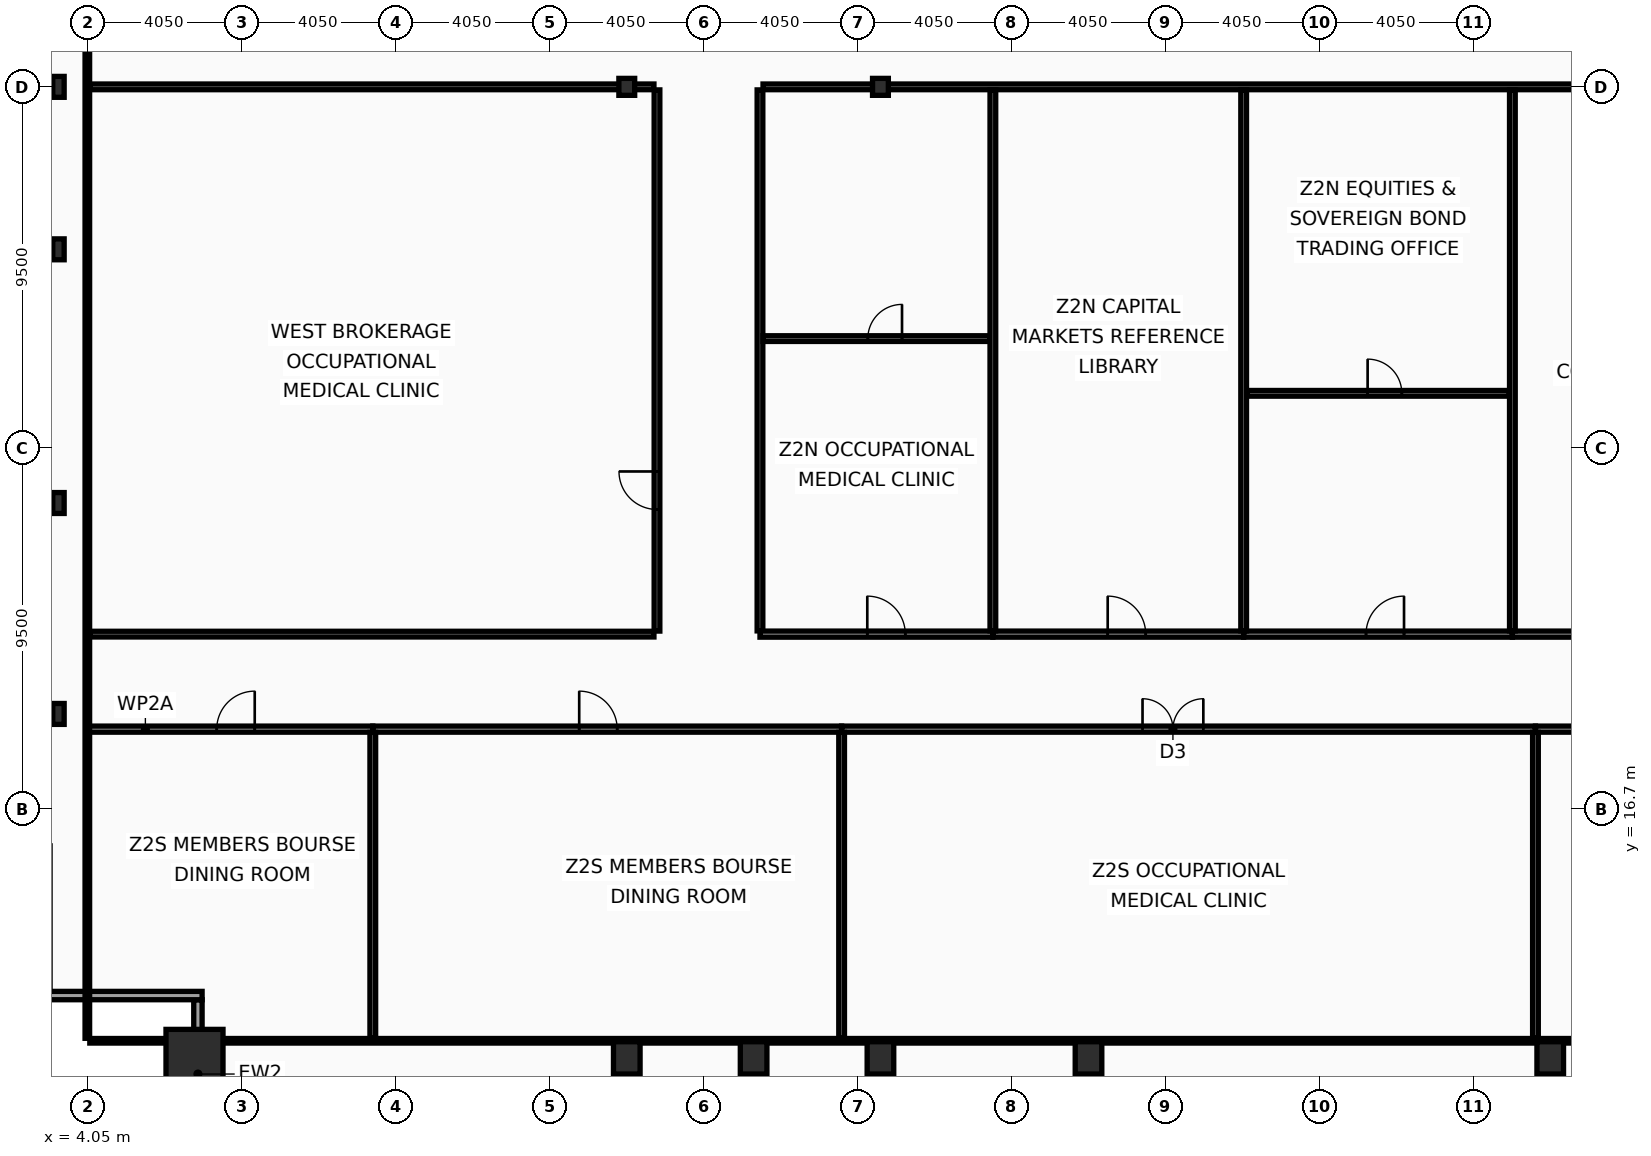
"""IFC4 building model, lengths in metres.
Left out: names, types, materials, properties, quantities, classifications, styles, units other than length and angle.
Written with IfcOpenShell. Run it as: python <this file> out.ifc"""

import sys

from ifc_helpers import new_model, si_unit, direction, frame, frame_2d, origin, origin_2d, place, context, subcontext, project, spatial, rectangle, hollow_rectangle, i_section, extrude, element, fill, save


model = new_model("IFC4")
c1 = context("Model", 3, precision=1e-05, world=origin(), true_north=direction((0.0, 1.0)))
c2 = subcontext(c1, "Body", "Model", "MODEL_VIEW")
j1 = project(units=[si_unit("LENGTHUNIT", "METRE"), si_unit("PLANEANGLEUNIT", "RADIAN")], contexts=[c1])
p1 = place(None, origin())
s1 = spatial("IfcSite", under=j1, at=p1, CompositionType="ELEMENT")
p2 = place(p1, origin())
s2 = spatial("IfcBuilding", under=s1, at=p2, CompositionType="ELEMENT")
p3 = place(p2, frame((0.0, 0.0, 114.6)))
s3 = spatial("IfcBuildingStorey", under=s2, at=p3, CompositionType="ELEMENT", Elevation=114.6)
p4 = place(p3, frame((6.85, 10.15, 0.0), z_axis=(0.0, 0.0, 1.0), x_axis=(1.0, 0.0, 0.0)))
e1 = element("IfcColumn", 1, at=p4, inside=s3, PredefinedType="COLUMN", context=c2, shape_type="SweptSolid", body=[
    extrude(hollow_rectangle(XDim=1.5, YDim=1.5, WallThickness=0.07, at=origin_2d()), origin(), (0.0, 0.0, 1.0), 3.6),
])
for number, where, z_axis, x_axis in (
    (2, (18.225, 10.15, 0.0), (0.0, 0.0, 1.0), (1.0, 0.0, 0.0)),
    (3, (21.562, 10.15, 0.0), (0.0, 0.0, 1.0), (1.0, 0.0, 0.0)),
    (4, (24.9, 10.15, 0.0), (0.0, 0.0, 1.0), (1.0, 0.0, 0.0)),
    (5, (30.375, 10.15, 0.0), (0.0, 0.0, 1.0), (1.0, 0.0, 0.0)),
    (6, (42.525, 10.15, 0.0), (0.0, 0.0, 1.0), (1.0, 0.0, 0.0)),
):
    element("IfcColumn", number, at=place(p3, frame(where, z_axis=z_axis, x_axis=x_axis)), inside=s3, PredefinedType="COLUMN", context=c2, shape_type="SweptSolid", body=[
        extrude(hollow_rectangle(XDim=0.7, YDim=0.85, WallThickness=0.05, at=origin_2d()), origin(), (0.0, 0.0, 1.0), 3.6),
    ])
for number, where, z_axis, x_axis in (
    (7, (3.27, 19.2, 0.0), (0.0, 0.0, 1.0), (1.0, 0.0, 0.0)),
    (8, (3.27, 24.75, 0.0), (0.0, 0.0, 1.0), (1.0, 0.0, 0.0)),
    (9, (3.27, 31.425, 0.0), (0.0, 0.0, 1.0), (1.0, 0.0, 0.0)),
    (10, (3.27, 35.7, 0.0), (0.0, 0.0, 1.0), (1.0, 0.0, 0.0)),
):
    element("IfcColumn", number, at=place(p3, frame(where, z_axis=z_axis, x_axis=x_axis)), inside=s3, PredefinedType="COLUMN", context=c2, shape_type="SweptSolid", body=[
        extrude(i_section(OverallWidth=0.3, OverallDepth=0.55, WebThickness=0.015, FlangeThickness=0.029, at=origin_2d()), origin(), (0.0, 0.0, 1.0), 3.6),
    ])
for number, where, z_axis, x_axis in (
    (11, (18.225, 35.7, 0.0), (0.0, 0.0, 1.0), (1.0, 0.0, 0.0)),
    (12, (24.9, 35.7, 0.0), (0.0, 0.0, 1.0), (1.0, 0.0, 0.0)),
):
    element("IfcColumn", number, at=place(p3, frame(where, z_axis=z_axis, x_axis=x_axis)), inside=s3, PredefinedType="COLUMN", context=c2, shape_type="SweptSolid", body=[
        extrude(i_section(OverallWidth=0.416, OverallDepth=0.446, WebThickness=0.039, FlangeThickness=0.063, at=origin_2d()), origin(), (0.0, 0.0, 1.0), 3.6),
    ])
p5 = place(p3, frame((6.94, 7.77, 0.0), z_axis=(0.0, 0.0, 1.0), x_axis=(0.0, 1.0, 0.0)))
e13 = element("IfcWall", 13, at=p5, inside=s3, PredefinedType="SOLIDWALL", context=c2, shape_type="SweptSolid", body=[
    extrude(rectangle(XDim=3.91, YDim=0.22, at=frame_2d((1.955, 0.0))), origin(), (0.0, 0.0, 1.0), 2.83),
])
p6 = place(p3, frame((7.05, 11.79, 0.0), z_axis=(0.0, 0.0, 1.0), x_axis=(-1.0, 0.0, 0.0)))
e14 = element("IfcWall", 14, at=p6, inside=s3, PredefinedType="SOLIDWALL", context=c2, shape_type="SweptSolid", body=[
    extrude(rectangle(XDim=4.22, YDim=0.22, at=frame_2d((2.11, 0.0))), origin(), (0.0, 0.0, 1.0), 2.83),
])
p7 = place(p3, frame((4.03, 18.8, 0.0), z_axis=(0.0, 0.0, 1.0), x_axis=(1.0, 0.0, 0.0)))
e15 = element("IfcWall", 15, at=p7, inside=s3, PredefinedType="PARTITIONING", context=c2, shape_type="SweptSolid", body=[
    extrude(rectangle(XDim=7.511, YDim=0.16, at=frame_2d((3.756, 0.0))), origin(), (0.0, 0.0, 1.0), 2.73),
])
p8 = place(p7, frame((3.405, 0.0, 0.0)))
e16 = element("IfcOpeningElement", 16, at=p8, cuts=e15, PredefinedType="OPENING", context=c2, shape_type="SweptSolid", body=[
    extrude(rectangle(XDim=1.0, YDim=2.05, at=frame_2d((0.5, 1.025))), frame((0.0, 0.09, 0.0), z_axis=(0.0, -1.0, 0.0), x_axis=(1.0, 0.0, 0.0)), (0.0, 0.0, 1.0), 0.18),
])
p9 = place(p3, frame((11.542, 18.8, 0.0), z_axis=(0.0, 0.0, 1.0), x_axis=(1.0, 0.0, 0.0)))
e17 = element("IfcWall", 17, at=p9, inside=s3, PredefinedType="PARTITIONING", context=c2, shape_type="SweptSolid", body=[
    extrude(rectangle(XDim=12.337, YDim=0.16, at=frame_2d((6.168, 0.0))), origin(), (0.0, 0.0, 1.0), 2.73),
])
p10 = place(p9, frame((5.431, 0.0, 0.0)))
e18 = element("IfcOpeningElement", 18, at=p10, cuts=e17, PredefinedType="OPENING", context=c2, shape_type="SweptSolid", body=[
    extrude(rectangle(XDim=1.0, YDim=2.05, at=frame_2d((0.5, 1.025))), frame((0.0, 0.09, 0.0), z_axis=(0.0, -1.0, 0.0), x_axis=(1.0, 0.0, 0.0)), (0.0, 0.0, 1.0), 0.18),
])
p11 = place(p3, frame((11.542, 10.665, 0.0), z_axis=(0.0, 0.0, 1.0), x_axis=(0.0, 1.0, 0.0)))
e19 = element("IfcWall", 19, at=p11, inside=s3, PredefinedType="PARTITIONING", context=c2, shape_type="SweptSolid", body=[
    extrude(rectangle(XDim=8.05, YDim=0.15, at=frame_2d((4.025, 0.0))), origin(), (0.0, 0.0, 1.0), 3.44),
])
p12 = place(p3, frame((23.878, 18.8, 0.0), z_axis=(0.0, 0.0, 1.0), x_axis=(1.0, 0.0, 0.0)))
e20 = element("IfcWall", 20, at=p12, inside=s3, PredefinedType="PARTITIONING", context=c2, shape_type="SweptSolid", body=[
    extrude(rectangle(XDim=18.258, YDim=0.16, at=frame_2d((9.129, 0.0))), origin(), (0.0, 0.0, 1.0), 2.73),
])
p13 = place(p12, frame((7.918, 0.0, 0.0)))
e21 = element("IfcOpeningElement", 21, at=p13, cuts=e20, PredefinedType="OPENING", context=c2, shape_type="SweptSolid", body=[
    extrude(rectangle(XDim=1.6, YDim=2.15, at=frame_2d((0.8, 1.075))), frame((0.0, 0.09, 0.0), z_axis=(0.0, -1.0, 0.0), x_axis=(1.0, 0.0, 0.0)), (0.0, 0.0, 1.0), 0.18),
])
p14 = place(p3, frame((23.878, 10.665, 0.0), z_axis=(0.0, 0.0, 1.0), x_axis=(0.0, 1.0, 0.0)))
e22 = element("IfcWall", 22, at=p14, inside=s3, PredefinedType="PARTITIONING", context=c2, shape_type="SweptSolid", body=[
    extrude(rectangle(XDim=8.05, YDim=0.15, at=frame_2d((4.025, 0.0))), origin(), (0.0, 0.0, 1.0), 2.88),
])
p15 = place(p3, frame((42.136, 18.8, 0.0), z_axis=(0.0, 0.0, 1.0), x_axis=(1.0, 0.0, 0.0)))
e23 = element("IfcWall", 23, at=p15, inside=s3, PredefinedType="PARTITIONING", context=c2, shape_type="SweptSolid", body=[
    extrude(rectangle(XDim=13.38, YDim=0.16, at=frame_2d((6.69, 0.0))), origin(), (0.0, 0.0, 1.0), 2.73),
])
p16 = place(p15, frame((5.87, 0.0, 0.0)))
e24 = element("IfcOpeningElement", 24, at=p16, cuts=e23, PredefinedType="OPENING", context=c2, shape_type="SweptSolid", body=[
    extrude(rectangle(XDim=1.0, YDim=2.05, at=frame_2d((0.5, 1.025))), frame((0.0, 0.09, 0.0), z_axis=(0.0, -1.0, 0.0), x_axis=(1.0, 0.0, 0.0)), (0.0, 0.0, 1.0), 0.18),
])
p17 = place(p3, frame((42.136, 10.665, 0.0), z_axis=(0.0, 0.0, 1.0), x_axis=(0.0, 1.0, 0.0)))
e25 = element("IfcWall", 25, at=p17, inside=s3, PredefinedType="PARTITIONING", context=c2, shape_type="SweptSolid", body=[
    extrude(rectangle(XDim=8.05, YDim=0.15, at=frame_2d((4.025, 0.0))), origin(), (0.0, 0.0, 1.0), 2.73),
])
p18 = place(p3, frame((19.02, 21.38, 0.0), z_axis=(0.0, 0.0, 1.0), x_axis=(0.0, 1.0, 0.0)))
e26 = element("IfcWall", 26, at=p18, inside=s3, PredefinedType="PARTITIONING", context=c2, shape_type="SweptSolid", body=[
    extrude(rectangle(XDim=14.24, YDim=0.15, at=frame_2d((7.12, 0.0))), origin(), (0.0, 0.0, 1.0), 2.88),
])
p19 = place(p18, frame((3.2, 0.0, 0.0)))
e27 = element("IfcOpeningElement", 27, at=p19, cuts=e26, PredefinedType="OPENING", context=c2, shape_type="SweptSolid", body=[
    extrude(rectangle(XDim=1.0, YDim=2.05, at=frame_2d((0.5, 1.025))), frame((0.0, 0.085, 0.0), z_axis=(0.0, -1.0, 0.0), x_axis=(1.0, 0.0, 0.0)), (0.0, 0.0, 1.0), 0.17),
])
for number, where, z_axis, x_axis in (
    (28, (4.095, 21.3, 0.0), (0.0, 0.0, 1.0), (1.0, 0.0, 0.0)),
    (29, (4.095, 35.7, 0.0), (0.0, 0.0, 1.0), (1.0, 0.0, 0.0)),
):
    element("IfcWall", number, at=place(p3, frame(where, z_axis=z_axis, x_axis=x_axis)), inside=s3, PredefinedType="PARTITIONING", context=c2, shape_type="SweptSolid", body=[
        extrude(rectangle(XDim=14.845, YDim=0.15, at=frame_2d((7.422, 0.0))), origin(), (0.0, 0.0, 1.0), 2.73),
    ])
p20 = place(p3, frame((21.73, 21.385, 0.0), z_axis=(0.0, 0.0, 1.0), x_axis=(0.0, 1.0, 0.0)))
e30 = element("IfcWall", 30, at=p20, inside=s3, PredefinedType="PARTITIONING", context=c2, shape_type="SweptSolid", body=[
    extrude(rectangle(XDim=14.235, YDim=0.15, at=frame_2d((7.118, 0.0))), origin(), (0.0, 0.0, 1.0), 2.88),
])
p21 = place(p3, frame((21.81, 35.7, 0.0), z_axis=(0.0, 0.0, 1.0), x_axis=(1.0, 0.0, 0.0)))
e31 = element("IfcWall", 31, at=p21, inside=s3, PredefinedType="PARTITIONING", context=c2, shape_type="SweptSolid", body=[
    extrude(rectangle(XDim=46.995, YDim=0.15, at=frame_2d((23.498, 0.0))), origin(), (0.0, 0.0, 1.0), 2.73),
])
p22 = place(p3, frame((21.73, 21.3, 0.0), z_axis=(0.0, 0.0, 1.0), x_axis=(1.0, 0.0, 0.0)))
e32 = element("IfcWall", 32, at=p22, inside=s3, PredefinedType="PARTITIONING", context=c2, shape_type="SweptSolid", body=[
    extrude(rectangle(XDim=6.128, YDim=0.16, at=frame_2d((3.064, 0.0))), origin(), (0.0, 0.0, 1.0), 2.73),
])
p23 = place(p22, frame((2.824, 0.0, 0.0)))
e33 = element("IfcOpeningElement", 33, at=p23, cuts=e32, PredefinedType="OPENING", context=c2, shape_type="SweptSolid", body=[
    extrude(rectangle(XDim=1.0, YDim=2.05, at=frame_2d((0.5, 1.025))), frame((0.0, 0.09, 0.0), z_axis=(0.0, -1.0, 0.0), x_axis=(1.0, 0.0, 0.0)), (0.0, 0.0, 1.0), 0.18),
])
p24 = place(p3, frame((21.81, 29.076, 0.0), z_axis=(0.0, 0.0, 1.0), x_axis=(1.0, 0.0, 0.0)))
e34 = element("IfcWall", 34, at=p24, inside=s3, PredefinedType="PARTITIONING", context=c2, shape_type="SweptSolid", body=[
    extrude(rectangle(XDim=5.968, YDim=0.15, at=frame_2d((2.984, 0.0))), origin(), (0.0, 0.0, 1.0), 2.73),
])
p25 = place(p24, frame((2.758, 0.0, 0.0)))
e35 = element("IfcOpeningElement", 35, at=p25, cuts=e34, PredefinedType="OPENING", context=c2, shape_type="SweptSolid", body=[
    extrude(rectangle(XDim=0.9, YDim=2.05, at=frame_2d((0.45, 1.025))), frame((0.0, 0.085, 0.0), z_axis=(0.0, -1.0, 0.0), x_axis=(1.0, 0.0, 0.0)), (0.0, 0.0, 1.0), 0.17),
])
p26 = place(p3, frame((27.858, 21.3, 0.0), z_axis=(0.0, 0.0, 1.0), x_axis=(1.0, 0.0, 0.0)))
e36 = element("IfcWall", 36, at=p26, inside=s3, PredefinedType="PARTITIONING", context=c2, shape_type="SweptSolid", body=[
    extrude(rectangle(XDim=6.6, YDim=0.16, at=frame_2d((3.3, 0.0))), origin(), (0.0, 0.0, 1.0), 2.73),
])
p27 = place(p26, frame((3.022, 0.0, 0.0)))
e37 = element("IfcOpeningElement", 37, at=p27, cuts=e36, PredefinedType="OPENING", context=c2, shape_type="SweptSolid", body=[
    extrude(rectangle(XDim=1.0, YDim=2.05, at=frame_2d((0.5, 1.025))), frame((0.0, 0.09, 0.0), z_axis=(0.0, -1.0, 0.0), x_axis=(1.0, 0.0, 0.0)), (0.0, 0.0, 1.0), 0.18),
])
p28 = place(p3, frame((27.858, 21.385, 0.0), z_axis=(0.0, 0.0, 1.0), x_axis=(0.0, 1.0, 0.0)))
e38 = element("IfcWall", 38, at=p28, inside=s3, PredefinedType="PARTITIONING", context=c2, shape_type="SweptSolid", body=[
    extrude(rectangle(XDim=14.235, YDim=0.15, at=frame_2d((7.118, 0.0))), origin(), (0.0, 0.0, 1.0), 2.88),
])
p29 = place(p3, frame((34.458, 21.3, 0.0), z_axis=(0.0, 0.0, 1.0), x_axis=(1.0, 0.0, 0.0)))
e39 = element("IfcWall", 39, at=p29, inside=s3, PredefinedType="PARTITIONING", context=c2, shape_type="SweptSolid", body=[
    extrude(rectangle(XDim=7.071, YDim=0.16, at=frame_2d((3.536, 0.0))), origin(), (0.0, 0.0, 1.0), 3.44),
])
p30 = place(p29, frame((3.22, 0.0, 0.0)))
e40 = element("IfcOpeningElement", 40, at=p30, cuts=e39, PredefinedType="OPENING", context=c2, shape_type="SweptSolid", body=[
    extrude(rectangle(XDim=1.0, YDim=2.05, at=frame_2d((0.5, 1.025))), frame((0.0, 0.09, 0.0), z_axis=(0.0, -1.0, 0.0), x_axis=(1.0, 0.0, 0.0)), (0.0, 0.0, 1.0), 0.18),
])
p31 = place(p3, frame((34.458, 21.385, 0.0), z_axis=(0.0, 0.0, 1.0), x_axis=(0.0, 1.0, 0.0)))
e41 = element("IfcWall", 41, at=p31, inside=s3, PredefinedType="PARTITIONING", context=c2, shape_type="SweptSolid", body=[
    extrude(rectangle(XDim=14.235, YDim=0.15, at=frame_2d((7.118, 0.0))), origin(), (0.0, 0.0, 1.0), 2.88),
])
p32 = place(p3, frame((34.538, 27.636, 0.0), z_axis=(0.0, 0.0, 1.0), x_axis=(1.0, 0.0, 0.0)))
e42 = element("IfcWall", 42, at=p32, inside=s3, PredefinedType="PARTITIONING", context=c2, shape_type="SweptSolid", body=[
    extrude(rectangle(XDim=6.911, YDim=0.15, at=frame_2d((3.456, 0.0))), origin(), (0.0, 0.0, 1.0), 3.44),
])
p33 = place(p32, frame((3.182, 0.0, 0.0)))
e43 = element("IfcOpeningElement", 43, at=p33, cuts=e42, PredefinedType="OPENING", context=c2, shape_type="SweptSolid", body=[
    extrude(rectangle(XDim=0.9, YDim=2.05, at=frame_2d((0.45, 1.025))), frame((0.0, 0.085, 0.0), z_axis=(0.0, -1.0, 0.0), x_axis=(1.0, 0.0, 0.0)), (0.0, 0.0, 1.0), 0.17),
])
p34 = place(p3, frame((41.529, 21.3, 0.0), z_axis=(0.0, 0.0, 1.0), x_axis=(1.0, 0.0, 0.0)))
e44 = element("IfcWall", 44, at=p34, inside=s3, PredefinedType="PARTITIONING", context=c2, shape_type="SweptSolid", body=[
    extrude(rectangle(XDim=7.542, YDim=0.16, at=frame_2d((3.771, 0.0))), origin(), (0.0, 0.0, 1.0), 2.73),
])
p35 = place(p34, frame((3.418, 0.0, 0.0)))
e45 = element("IfcOpeningElement", 45, at=p35, cuts=e44, PredefinedType="OPENING", context=c2, shape_type="SweptSolid", body=[
    extrude(rectangle(XDim=1.0, YDim=2.05, at=frame_2d((0.5, 1.025))), frame((0.0, 0.09, 0.0), z_axis=(0.0, -1.0, 0.0), x_axis=(1.0, 0.0, 0.0)), (0.0, 0.0, 1.0), 0.18),
])
p36 = place(p3, frame((41.529, 21.385, 0.0), z_axis=(0.0, 0.0, 1.0), x_axis=(0.0, 1.0, 0.0)))
e46 = element("IfcWall", 46, at=p36, inside=s3, PredefinedType="PARTITIONING", context=c2, shape_type="SweptSolid", body=[
    extrude(rectangle(XDim=14.235, YDim=0.15, at=frame_2d((7.118, 0.0))), origin(), (0.0, 0.0, 1.0), 2.88),
])
p37 = place(p3, frame((4.03, 10.665, 0.0), z_axis=(0.0, 0.0, 1.0), x_axis=(0.0, 1.0, 0.0)))
e47 = element("IfcWall", 47, at=p37, inside=s3, PredefinedType="PARTITIONING", context=c2, shape_type="SweptSolid", body=[
    extrude(rectangle(XDim=42.11, YDim=0.12, at=frame_2d((21.055, 0.0))), origin(), (0.0, 0.0, 1.0), 2.73),
])
p38 = place(p3, frame((4.095, 10.6, 0.0), z_axis=(0.0, 0.0, 1.0), x_axis=(1.0, 0.0, 0.0)))
e48 = element("IfcWall", 48, at=p38, inside=s3, PredefinedType="PARTITIONING", context=c2, shape_type="SweptSolid", body=[
    extrude(rectangle(XDim=64.71, YDim=0.12, at=frame_2d((32.355, 0.0))), origin(), (0.0, 0.0, 1.0), 2.73),
])
p39 = place(p8, origin())
e49 = element("IfcDoor", 49, at=p39, inside=s3, OperationType="SINGLE_SWING_RIGHT", PredefinedType="DOOR", context=c2, shape_type="SweptSolid", body=[
    extrude(rectangle(XDim=1.0, YDim=2.05, at=frame_2d((0.5, 1.025))), frame((0.0, 0.025, 0.0), z_axis=(0.0, -1.0, 0.0), x_axis=(1.0, 0.0, 0.0)), (0.0, 0.0, 1.0), 0.05),
])
fill(e16, e49)
p40 = place(p10, origin())
e50 = element("IfcDoor", 50, at=p40, inside=s3, OperationType="SINGLE_SWING_LEFT", PredefinedType="DOOR", context=c2, shape_type="SweptSolid", body=[
    extrude(rectangle(XDim=1.0, YDim=2.05, at=frame_2d((0.5, 1.025))), frame((0.0, 0.025, 0.0), z_axis=(0.0, -1.0, 0.0), x_axis=(1.0, 0.0, 0.0)), (0.0, 0.0, 1.0), 0.05),
])
fill(e18, e50)
p41 = place(p13, origin())
e51 = element("IfcDoor", 51, at=p41, inside=s3, OperationType="DOUBLE_DOOR_SINGLE_SWING", PredefinedType="DOOR", context=c2, shape_type="SweptSolid", body=[
    extrude(rectangle(XDim=1.6, YDim=2.15, at=frame_2d((0.8, 1.075))), frame((0.0, 0.025, 0.0), z_axis=(0.0, -1.0, 0.0), x_axis=(1.0, 0.0, 0.0)), (0.0, 0.0, 1.0), 0.05),
])
fill(e21, e51)
p42 = place(p19, origin())
e52 = element("IfcDoor", 52, at=p42, inside=s3, OperationType="SINGLE_SWING_RIGHT", PredefinedType="DOOR", context=c2, shape_type="SweptSolid", body=[
    extrude(rectangle(XDim=1.0, YDim=2.05, at=frame_2d((0.5, 1.025))), frame((0.0, 0.025, 0.0), z_axis=(0.0, -1.0, 0.0), x_axis=(1.0, 0.0, 0.0)), (0.0, 0.0, 1.0), 0.05),
])
fill(e27, e52)
p43 = place(p23, origin())
e53 = element("IfcDoor", 53, at=p43, inside=s3, OperationType="SINGLE_SWING_LEFT", PredefinedType="DOOR", context=c2, shape_type="SweptSolid", body=[
    extrude(rectangle(XDim=1.0, YDim=2.05, at=frame_2d((0.5, 1.025))), frame((0.0, 0.025, 0.0), z_axis=(0.0, -1.0, 0.0), x_axis=(1.0, 0.0, 0.0)), (0.0, 0.0, 1.0), 0.05),
])
fill(e33, e53)
p44 = place(p25, origin())
e54 = element("IfcDoor", 54, at=p44, inside=s3, OperationType="SINGLE_SWING_RIGHT", PredefinedType="DOOR", context=c2, shape_type="SweptSolid", body=[
    extrude(rectangle(XDim=0.9, YDim=2.05, at=frame_2d((0.45, 1.025))), frame((0.0, 0.025, 0.0), z_axis=(0.0, -1.0, 0.0), x_axis=(1.0, 0.0, 0.0)), (0.0, 0.0, 1.0), 0.05),
])
fill(e35, e54)
p45 = place(p27, origin())
e55 = element("IfcDoor", 55, at=p45, inside=s3, OperationType="SINGLE_SWING_LEFT", PredefinedType="DOOR", context=c2, shape_type="SweptSolid", body=[
    extrude(rectangle(XDim=1.0, YDim=2.05, at=frame_2d((0.5, 1.025))), frame((0.0, 0.025, 0.0), z_axis=(0.0, -1.0, 0.0), x_axis=(1.0, 0.0, 0.0)), (0.0, 0.0, 1.0), 0.05),
])
fill(e37, e55)
p46 = place(p30, origin())
e56 = element("IfcDoor", 56, at=p46, inside=s3, OperationType="SINGLE_SWING_RIGHT", PredefinedType="DOOR", context=c2, shape_type="SweptSolid", body=[
    extrude(rectangle(XDim=1.0, YDim=2.05, at=frame_2d((0.5, 1.025))), frame((0.0, 0.025, 0.0), z_axis=(0.0, -1.0, 0.0), x_axis=(1.0, 0.0, 0.0)), (0.0, 0.0, 1.0), 0.05),
])
fill(e40, e56)
p47 = place(p33, origin())
e57 = element("IfcDoor", 57, at=p47, inside=s3, OperationType="SINGLE_SWING_LEFT", PredefinedType="DOOR", context=c2, shape_type="SweptSolid", body=[
    extrude(rectangle(XDim=0.9, YDim=2.05, at=frame_2d((0.45, 1.025))), frame((0.0, 0.025, 0.0), z_axis=(0.0, -1.0, 0.0), x_axis=(1.0, 0.0, 0.0)), (0.0, 0.0, 1.0), 0.05),
])
fill(e43, e57)
save(model, sys.argv[1])
